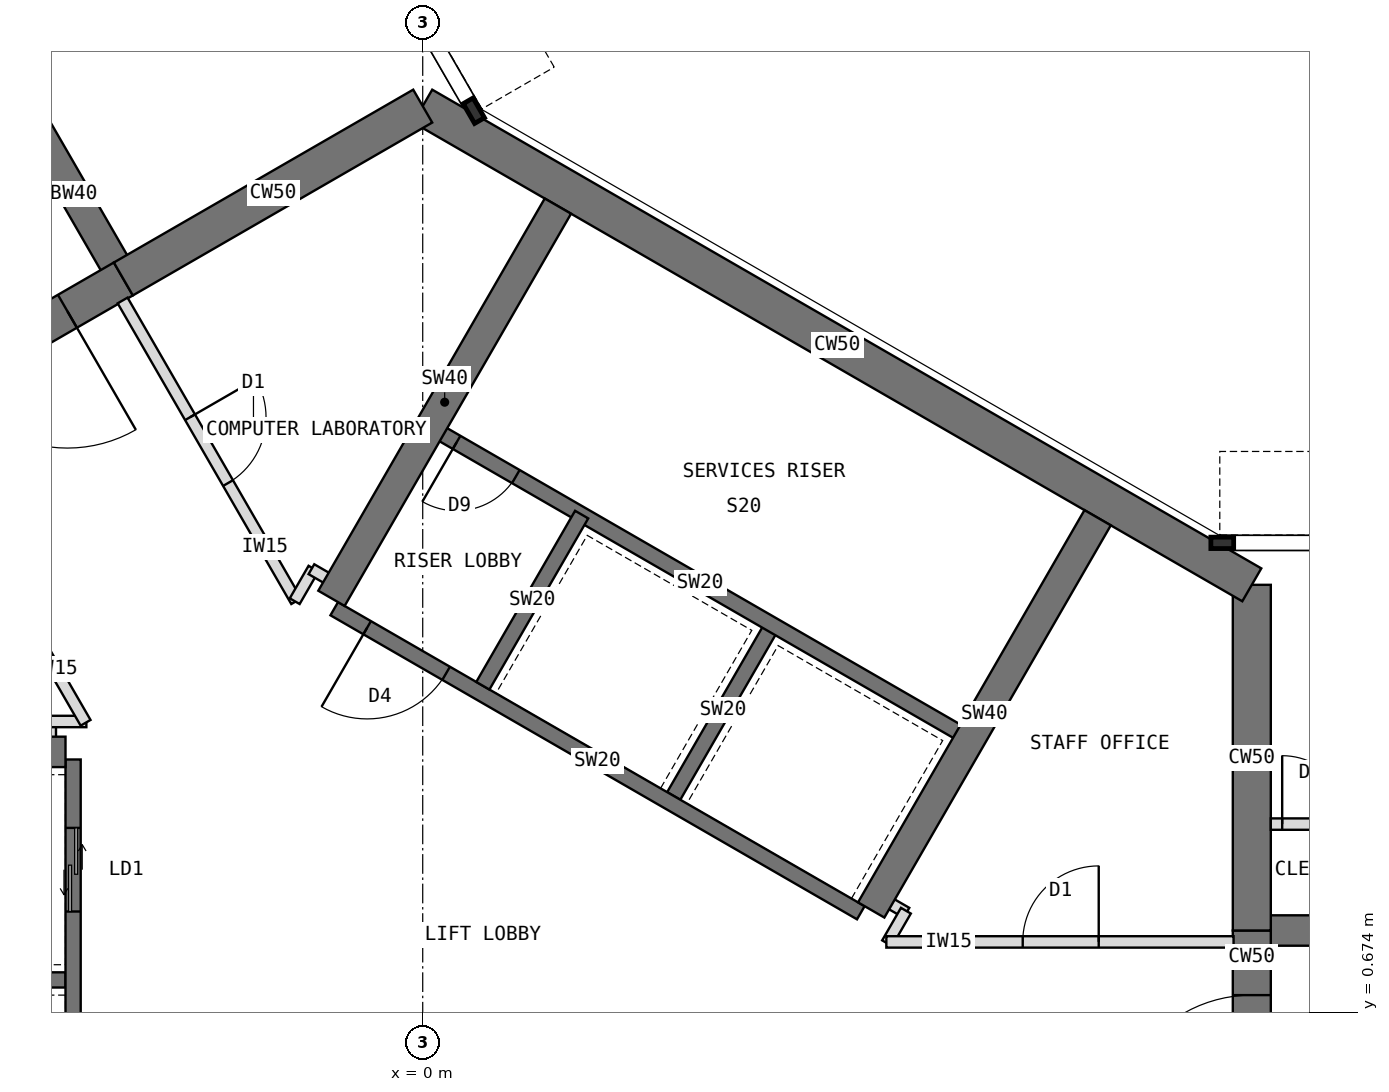
"""IFC4 building model, lengths in metres.
Left out: names, types, materials, properties, quantities, classifications, styles, units other than length and angle.
Written with IfcOpenShell. Run it as: python <this file> out.ifc"""

import sys

from ifc_helpers import new_model, si_unit, direction, frame, frame_2d, origin, place, context, subcontext, project, spatial, rectangle, extrude, element, fill, save


model = new_model("IFC4")
c1 = context("Model", 3, precision=1e-05, world=origin(), true_north=direction((0.0, 1.0)))
c2 = subcontext(c1, "Body", "Model", "MODEL_VIEW")
j1 = project(units=[si_unit("LENGTHUNIT", "METRE"), si_unit("PLANEANGLEUNIT", "RADIAN")], contexts=[c1])
p1 = place(None, origin())
s1 = spatial("IfcSite", under=j1, at=p1, CompositionType="ELEMENT")
p2 = place(p1, origin())
s2 = spatial("IfcBuilding", under=s1, at=p2, CompositionType="ELEMENT")
p3 = place(p2, frame((0.0, 0.0, 194.5)))
s3 = spatial("IfcBuildingStorey", under=s2, at=p3, CompositionType="ELEMENT", Elevation=194.5)
p4 = place(p3, frame((10.908, -1.75, 0.0), z_axis=(0.0, 0.0, 1.0), x_axis=(0.0, 1.0, 0.0)))
e1 = element("IfcWall", 1, at=p4, inside=s3, PredefinedType="SHEAR", context=c2, shape_type="SweptSolid", body=[
    extrude(rectangle(XDim=3.5, YDim=0.5, at=frame_2d((1.75, 0.0))), origin(), (0.0, 0.0, 1.0), 4.0),
])
p5 = place(p4, frame((0.85, 0.0, 0.0)))
e2 = element("IfcOpeningElement", 2, at=p5, cuts=e1, PredefinedType="OPENING", context=c2, shape_type="SweptSolid", body=[
    extrude(rectangle(XDim=1.8, YDim=2.1, at=frame_2d((0.9, 1.05))), frame((0.0, 0.26, 0.0), z_axis=(0.0, -1.0, 0.0), x_axis=(1.0, 0.0, 0.0)), (0.0, 0.0, 1.0), 0.52),
])
p6 = place(p3, frame((10.908, 1.75, 0.0), z_axis=(0.0, 0.0, 1.0), x_axis=(0.0, 1.0, 0.0)))
e3 = element("IfcWall", 3, at=p6, inside=s3, PredefinedType="SHEAR", context=c2, shape_type="SweptSolid", body=[
    extrude(rectangle(XDim=4.548, YDim=0.5, at=frame_2d((2.274, 0.0))), origin(), (0.0, 0.0, 1.0), 4.0),
])
p7 = place(p3, frame((10.908, 6.298, 0.0), z_axis=(0.0, 0.0, 1.0), x_axis=(-0.866021940709, 0.500005998175, 0.0)))
e4 = element("IfcWall", 4, at=p7, inside=s3, PredefinedType="SHEAR", context=c2, shape_type="SweptSolid", body=[
    extrude(rectangle(XDim=12.596, YDim=0.5, at=frame_2d((6.298, 0.0))), origin(), (0.0, 0.0, 1.0), 4.0),
])
p8 = place(p3, frame((0.0, 12.596, 0.0), z_axis=(0.0, 0.0, 1.0), x_axis=(-0.866011268655, -0.500024481964, 0.0)))
e5 = element("IfcWall", 5, at=p8, inside=s3, PredefinedType="SHEAR", context=c2, shape_type="SweptSolid", body=[
    extrude(rectangle(XDim=4.548, YDim=0.5, at=frame_2d((2.274, 0.0))), origin(), (0.0, 0.0, 1.0), 4.0),
])
p9 = place(p3, frame((-3.939, 10.322, 0.0), z_axis=(0.0, 0.0, 1.0), x_axis=(-0.866019471182, -0.500010275428, 0.0)))
e6 = element("IfcWall", 6, at=p9, inside=s3, PredefinedType="SHEAR", context=c2, shape_type="SweptSolid", body=[
    extrude(rectangle(XDim=3.5, YDim=0.5, at=frame_2d((1.75, 0.0))), origin(), (0.0, 0.0, 1.0), 4.0),
])
p10 = place(p9, frame((0.85, 0.0, 0.0)))
e7 = element("IfcOpeningElement", 7, at=p10, cuts=e6, PredefinedType="OPENING", context=c2, shape_type="SweptSolid", body=[
    extrude(rectangle(XDim=1.8, YDim=2.1, at=frame_2d((0.9, 1.05))), frame((0.0, 0.26, 0.0), z_axis=(0.0, -1.0, 0.0), x_axis=(1.0, 0.0, 0.0)), (0.0, 0.0, 1.0), 0.52),
])
p11 = place(p3, frame((10.908, 1.75, 0.0), z_axis=(0.0, 0.0, 1.0), x_axis=(1.0, 0.0, 0.0)))
e8 = element("IfcWall", 8, at=p11, inside=s3, PredefinedType="SHEAR", context=c2, shape_type="SweptSolid", body=[
    extrude(rectangle(XDim=2.592, YDim=0.4, at=frame_2d((1.296, 0.0))), origin(), (0.0, 0.0, 1.0), 4.0),
])
p12 = place(p3, frame((-3.939, 10.322, 0.0), z_axis=(0.0, 0.0, 1.0), x_axis=(-0.499918158782, 0.866072649678, 0.0)))
e9 = element("IfcWall", 9, at=p12, inside=s3, PredefinedType="SHEAR", context=c2, shape_type="SweptSolid", body=[
    extrude(rectangle(XDim=2.592, YDim=0.4, at=frame_2d((1.296, 0.0))), origin(), (0.0, 0.0, 1.0), 4.0),
])
p13 = place(p3, frame((5.764, 1.984, 0.0), z_axis=(0.0, 0.0, 1.0), x_axis=(-0.866026010844, 0.49999894854, 0.0)))
e10 = element("IfcWall", 10, at=p13, inside=s3, PredefinedType="SHEAR", context=c2, shape_type="SweptSolid", body=[
    extrude(rectangle(XDim=8.0, YDim=0.2, at=frame_2d((4.0, 0.0))), origin(), (0.0, 0.0, 1.0), 4.0),
])
p14 = place(p13, frame((6.3, 0.0, 0.0)))
e11 = element("IfcOpeningElement", 11, at=p14, cuts=e10, PredefinedType="OPENING", context=c2, shape_type="SweptSolid", body=[
    extrude(rectangle(XDim=1.2, YDim=2.1, at=frame_2d((0.6, 1.05))), frame((0.0, 0.11, 0.0), z_axis=(0.0, -1.0, 0.0), x_axis=(1.0, 0.0, 0.0)), (0.0, 0.0, 1.0), 0.22),
])
for number, where, z_axis, x_axis in (
    (12, (3.303, 3.52, 0.0), (0.0, 0.0, 1.0), (0.5, 0.866, 0.0)),
    (13, (0.791, 4.97, 0.0), (0.0, 0.0, 1.0), (0.5, 0.866, 0.0)),
):
    element("IfcWall", number, at=place(p3, frame(where, z_axis=z_axis, x_axis=x_axis)), inside=s3, PredefinedType="SHEAR", context=c2, shape_type="SweptSolid", body=[
        extrude(rectangle(XDim=2.6, YDim=0.2, at=frame_2d((1.3, 0.0))), origin(), (0.0, 0.0, 1.0), 4.0),
    ])
p15 = place(p3, frame((7.114, 4.322, 0.0), z_axis=(0.0, 0.0, 1.0), x_axis=(-0.866026010844, 0.49999894854, 0.0)))
e14 = element("IfcWall", 14, at=p15, inside=s3, PredefinedType="SHEAR", context=c2, shape_type="SweptSolid", body=[
    extrude(rectangle(XDim=8.0, YDim=0.2, at=frame_2d((4.0, 0.0))), origin(), (0.0, 0.0, 1.0), 4.0),
])
p16 = place(p15, frame((6.8, 0.0, 0.0)))
e15 = element("IfcOpeningElement", 15, at=p16, cuts=e14, PredefinedType="OPENING", context=c2, shape_type="SweptSolid", body=[
    extrude(rectangle(XDim=0.9, YDim=2.1, at=frame_2d((0.45, 1.05))), frame((0.0, 0.11, 0.0), z_axis=(0.0, -1.0, 0.0), x_axis=(1.0, 0.0, 0.0)), (0.0, 0.0, 1.0), 0.22),
])
p17 = place(p3, frame((-1.201, 6.12, 0.0), z_axis=(0.0, 0.0, 1.0), x_axis=(0.500021575205, 0.866012946976, 0.0)))
e16 = element("IfcWall", 16, at=p17, inside=s3, PredefinedType="SHEAR", context=c2, shape_type="SweptSolid", body=[
    extrude(rectangle(XDim=5.958, YDim=0.4, at=frame_2d((2.979, 0.0))), origin(), (0.0, 0.0, 1.0), 4.0),
])
p18 = place(p3, frame((5.901, 2.02, 0.0), z_axis=(0.0, 0.0, 1.0), x_axis=(0.500003832394, 0.86602319114, 0.0)))
e17 = element("IfcWall", 17, at=p18, inside=s3, PredefinedType="SHEAR", context=c2, shape_type="SweptSolid", body=[
    extrude(rectangle(XDim=5.958, YDim=0.4, at=frame_2d((2.979, 0.0))), origin(), (0.0, 0.0, 1.0), 4.0),
])
p19 = place(p3, frame((-4.6, 4.0, 0.0), z_axis=(0.0, 0.0, 1.0), x_axis=(0.0, -1.0, 0.0)))
e18 = element("IfcWall", 18, at=p19, inside=s3, PredefinedType="SHEAR", context=c2, shape_type="SweptSolid", body=[
    extrude(rectangle(XDim=8.0, YDim=0.2, at=frame_2d((4.0, 0.0))), origin(), (0.0, 0.0, 1.0), 4.0),
])
p20 = place(p19, frame((6.3, 0.0, 0.0)))
e19 = element("IfcOpeningElement", 19, at=p20, cuts=e18, PredefinedType="OPENING", context=c2, shape_type="SweptSolid", body=[
    extrude(rectangle(XDim=1.2, YDim=2.1, at=frame_2d((0.6, 1.05))), frame((0.0, 0.11, 0.0), z_axis=(0.0, -1.0, 0.0), x_axis=(1.0, 0.0, 0.0)), (0.0, 0.0, 1.0), 0.22),
])
p21 = place(p19, frame((0.9, 0.0, 0.0)))
e20 = element("IfcOpeningElement", 20, at=p21, cuts=e18, PredefinedType="OPENING", context=c2, shape_type="SweptSolid", body=[
    extrude(rectangle(XDim=1.1, YDim=2.2, at=frame_2d((0.55, 1.1))), frame((0.0, 0.11, 0.0), z_axis=(0.0, -1.0, 0.0), x_axis=(1.0, 0.0, 0.0)), (0.0, 0.0, 1.0), 0.22),
])
p22 = place(p3, frame((-4.7, 1.1, 0.0), z_axis=(0.0, 0.0, 1.0), x_axis=(-1.0, 0.0, 0.0)))
e21 = element("IfcWall", 21, at=p22, inside=s3, PredefinedType="SHEAR", context=c2, shape_type="SweptSolid", body=[
    extrude(rectangle(XDim=2.6, YDim=0.2, at=frame_2d((1.3, 0.0))), origin(), (0.0, 0.0, 1.0), 4.0),
])
p23 = place(p3, frame((-4.7, 4.1, 0.0), z_axis=(0.0, 0.0, 1.0), x_axis=(-1.0, 0.0, 0.0)))
e22 = element("IfcWall", 22, at=p23, inside=s3, PredefinedType="SHEAR", context=c2, shape_type="SweptSolid", body=[
    extrude(rectangle(XDim=5.958, YDim=0.4, at=frame_2d((2.979, 0.0))), origin(), (0.0, 0.0, 1.0), 4.0),
])
p24 = place(p3, frame((11.158, 3.15, 0.0), z_axis=(0.0, 0.0, 1.0), x_axis=(1.0, 0.0, 0.0)))
e23 = element("IfcWall", 23, at=p24, inside=s3, PredefinedType="PARTITIONING", context=c2, shape_type="SweptSolid", body=[
    extrude(rectangle(XDim=2.4, YDim=0.15, at=frame_2d((1.2, 0.0))), origin(), (0.0, 0.0, 1.0), 3.8),
])
p25 = place(p24, frame((0.15, 0.0, 0.0)))
e24 = element("IfcOpeningElement", 24, at=p25, cuts=e23, PredefinedType="OPENING", context=c2, shape_type="SweptSolid", body=[
    extrude(rectangle(XDim=0.9, YDim=2.1, at=frame_2d((0.45, 1.05))), frame((0.0, 0.085, 0.0), z_axis=(0.0, -1.0, 0.0), x_axis=(1.0, 0.0, 0.0)), (0.0, 0.0, 1.0), 0.17),
])
p26 = place(p3, frame((-4.9, 4.09, 0.0), z_axis=(0.0, 0.0, 1.0), x_axis=(0.0, 1.0, 0.0)))
e25 = element("IfcWall", 25, at=p26, inside=s3, PredefinedType="PARTITIONING", context=c2, shape_type="SweptSolid", body=[
    extrude(rectangle(XDim=0.43, YDim=0.15, at=frame_2d((0.215, 0.0))), origin(), (0.0, 0.0, 1.0), 3.8),
])
p27 = place(p3, frame((-4.92, 4.5, 0.0), z_axis=(0.0, 0.0, 1.0), x_axis=(1.0, 0.0, 0.0)))
e26 = element("IfcWall", 26, at=p27, inside=s3, PredefinedType="PARTITIONING", context=c2, shape_type="SweptSolid", body=[
    extrude(rectangle(XDim=0.494, YDim=0.15, at=frame_2d((0.247, 0.0))), origin(), (0.0, 0.0, 1.0), 3.8),
])
p28 = place(p3, frame((-4.436, 4.483, 0.0), z_axis=(0.0, 0.0, 1.0), x_axis=(-0.500001558674, 0.866024503882, 0.0)))
e27 = element("IfcWall", 27, at=p28, inside=s3, PredefinedType="PARTITIONING", context=c2, shape_type="SweptSolid", body=[
    extrude(rectangle(XDim=4.568, YDim=0.15, at=frame_2d((2.284, 0.0))), origin(), (0.0, 0.0, 1.0), 3.8),
])
p29 = place(p28, frame((1.794, 0.0, 0.0)))
e28 = element("IfcOpeningElement", 28, at=p29, cuts=e27, PredefinedType="OPENING", context=c2, shape_type="SweptSolid", body=[
    extrude(rectangle(XDim=1.0, YDim=2.1, at=frame_2d((0.5, 1.05))), frame((0.0, 0.085, 0.0), z_axis=(0.0, -1.0, 0.0), x_axis=(1.0, 0.0, 0.0)), (0.0, 0.0, 1.0), 0.17),
])
p30 = place(p3, frame((-3.948, 10.039, 0.0), z_axis=(0.0, 0.0, 1.0), x_axis=(0.500001558674, -0.866024503882, 0.0)))
e29 = element("IfcWall", 29, at=p30, inside=s3, PredefinedType="PARTITIONING", context=c2, shape_type="SweptSolid", body=[
    extrude(rectangle(XDim=4.568, YDim=0.15, at=frame_2d((2.284, 0.0))), origin(), (0.0, 0.0, 1.0), 3.8),
])
p31 = place(p30, frame((1.774, 0.0, 0.0)))
e30 = element("IfcOpeningElement", 30, at=p31, cuts=e29, PredefinedType="OPENING", context=c2, shape_type="SweptSolid", body=[
    extrude(rectangle(XDim=1.0, YDim=2.1, at=frame_2d((0.5, 1.05))), frame((0.0, 0.085, 0.0), z_axis=(0.0, -1.0, 0.0), x_axis=(1.0, 0.0, 0.0)), (0.0, 0.0, 1.0), 0.17),
])
p32 = place(p3, frame((-1.684, 6.083, 0.0), z_axis=(0.0, 0.0, 1.0), x_axis=(0.50033519877, 0.865831790172, 0.0)))
e31 = element("IfcWall", 31, at=p32, inside=s3, PredefinedType="PARTITIONING", context=c2, shape_type="SweptSolid", body=[
    extrude(rectangle(XDim=0.494, YDim=0.15, at=frame_2d((0.247, 0.0))), origin(), (0.0, 0.0, 1.0), 3.8),
])
for number, where, z_axis, x_axis in (
    (32, (-1.464, 6.503, 0.0), (0.0, 0.0, 1.0), (0.866, -0.5, 0.0)),
    (33, (5.992, 2.198, 0.0), (0.0, 0.0, 1.0), (0.866, -0.5, 0.0)),
):
    element("IfcWall", number, at=place(p3, frame(where, z_axis=z_axis, x_axis=x_axis)), inside=s3, PredefinedType="PARTITIONING", context=c2, shape_type="SweptSolid", body=[
        extrude(rectangle(XDim=0.43, YDim=0.15, at=frame_2d((0.215, 0.0))), origin(), (0.0, 0.0, 1.0), 3.8),
    ])
p33 = place(p3, frame((6.357, 2.011, 0.0), z_axis=(0.0, 0.0, 1.0), x_axis=(-0.50033519877, -0.865831790172, 0.0)))
e34 = element("IfcWall", 34, at=p33, inside=s3, PredefinedType="PARTITIONING", context=c2, shape_type="SweptSolid", body=[
    extrude(rectangle(XDim=0.494, YDim=0.15, at=frame_2d((0.247, 0.0))), origin(), (0.0, 0.0, 1.0), 3.8),
])
p34 = place(p3, frame((6.1, 1.6, 0.0), z_axis=(0.0, 0.0, 1.0), x_axis=(1.0, 0.0, 0.0)))
e35 = element("IfcWall", 35, at=p34, inside=s3, PredefinedType="PARTITIONING", context=c2, shape_type="SweptSolid", body=[
    extrude(rectangle(XDim=4.568, YDim=0.15, at=frame_2d((2.284, 0.0))), origin(), (0.0, 0.0, 1.0), 3.8),
])
p35 = place(p34, frame((1.794, 0.0, 0.0)))
e36 = element("IfcOpeningElement", 36, at=p35, cuts=e35, PredefinedType="OPENING", context=c2, shape_type="SweptSolid", body=[
    extrude(rectangle(XDim=1.0, YDim=2.1, at=frame_2d((0.5, 1.05))), frame((0.0, 0.085, 0.0), z_axis=(0.0, -1.0, 0.0), x_axis=(1.0, 0.0, 0.0)), (0.0, 0.0, 1.0), 0.17),
])
p36 = place(p14, origin())
e37 = element("IfcDoor", 37, at=p36, inside=s3, OperationType="SINGLE_SWING_RIGHT", PredefinedType="DOOR", context=c2, shape_type="SweptSolid", body=[
    extrude(rectangle(XDim=1.2, YDim=2.1, at=frame_2d((0.6, 1.05))), frame((0.0, 0.025, 0.0), z_axis=(0.0, -1.0, 0.0), x_axis=(1.0, 0.0, 0.0)), (0.0, 0.0, 1.0), 0.05),
])
fill(e11, e37)
p37 = place(p16, origin())
e38 = element("IfcDoor", 38, at=p37, inside=s3, OperationType="SINGLE_SWING_RIGHT", PredefinedType="DOOR", context=c2, shape_type="SweptSolid", body=[
    extrude(rectangle(XDim=0.9, YDim=2.1, at=frame_2d((0.45, 1.05))), frame((0.0, 0.025, 0.0), z_axis=(0.0, -1.0, 0.0), x_axis=(1.0, 0.0, 0.0)), (0.0, 0.0, 1.0), 0.05),
])
fill(e15, e38)
p38 = place(p21, origin())
e39 = element("IfcDoor", 39, at=p38, inside=s3, OperationType="DOUBLE_DOOR_SLIDING", PredefinedType="DOOR", context=c2, shape_type="SweptSolid", body=[
    extrude(rectangle(XDim=1.1, YDim=2.2, at=frame_2d((0.55, 1.1))), frame((0.0, 0.025, 0.0), z_axis=(0.0, -1.0, 0.0), x_axis=(1.0, 0.0, 0.0)), (0.0, 0.0, 1.0), 0.05),
])
fill(e20, e39)
p39 = place(p5, origin())
e40 = element("IfcDoor", 40, at=p39, inside=s3, OperationType="DOUBLE_DOOR_DOUBLE_SWING", PredefinedType="DOOR", context=c2, shape_type="SweptSolid", body=[
    extrude(rectangle(XDim=1.8, YDim=2.1, at=frame_2d((0.9, 1.05))), frame((0.0, 0.025, 0.0), z_axis=(0.0, -1.0, 0.0), x_axis=(1.0, 0.0, 0.0)), (0.0, 0.0, 1.0), 0.05),
])
fill(e2, e40)
p40 = place(p10, origin())
e41 = element("IfcDoor", 41, at=p40, inside=s3, OperationType="DOUBLE_DOOR_DOUBLE_SWING", PredefinedType="DOOR", context=c2, shape_type="SweptSolid", body=[
    extrude(rectangle(XDim=1.8, YDim=2.1, at=frame_2d((0.9, 1.05))), frame((0.0, 0.025, 0.0), z_axis=(0.0, -1.0, 0.0), x_axis=(1.0, 0.0, 0.0)), (0.0, 0.0, 1.0), 0.05),
])
fill(e7, e41)
p41 = place(p25, origin())
e42 = element("IfcDoor", 42, at=p41, inside=s3, OperationType="SINGLE_SWING_LEFT", PredefinedType="DOOR", context=c2, shape_type="SweptSolid", body=[
    extrude(rectangle(XDim=0.9, YDim=2.1, at=frame_2d((0.45, 1.05))), frame((0.0, 0.025, 0.0), z_axis=(0.0, -1.0, 0.0), x_axis=(1.0, 0.0, 0.0)), (0.0, 0.0, 1.0), 0.05),
])
fill(e24, e42)
p42 = place(p35, origin())
e43 = element("IfcDoor", 43, at=p42, inside=s3, OperationType="SINGLE_SWING_RIGHT", PredefinedType="DOOR", context=c2, shape_type="SweptSolid", body=[
    extrude(rectangle(XDim=1.0, YDim=2.1, at=frame_2d((0.5, 1.05))), frame((0.0, 0.025, 0.0), z_axis=(0.0, -1.0, 0.0), x_axis=(1.0, 0.0, 0.0)), (0.0, 0.0, 1.0), 0.05),
])
fill(e36, e43)
p43 = place(p31, origin())
e44 = element("IfcDoor", 44, at=p43, inside=s3, OperationType="SINGLE_SWING_LEFT", PredefinedType="DOOR", context=c2, shape_type="SweptSolid", body=[
    extrude(rectangle(XDim=1.0, YDim=2.1, at=frame_2d((0.5, 1.05))), frame((0.0, 0.025, 0.0), z_axis=(0.0, -1.0, 0.0), x_axis=(1.0, 0.0, 0.0)), (0.0, 0.0, 1.0), 0.05),
])
fill(e30, e44)
save(model, sys.argv[1])
